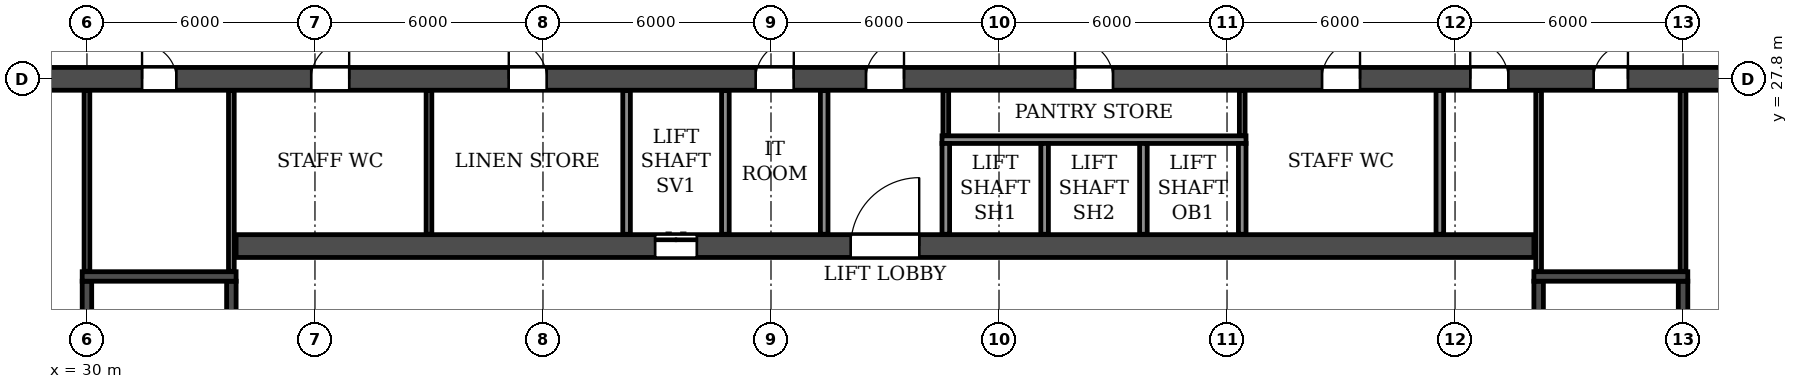
"""IFC4 building model, lengths in metres.
Left out: names, types, materials, properties, quantities, classifications, styles, units other than length and angle.
Written with IfcOpenShell. Run it as: python <this file> out.ifc"""

import sys

from ifc_helpers import new_model, si_unit, direction, frame, frame_2d, origin, place, context, subcontext, project, spatial, rectangle, extrude, element, fill, save


model = new_model("IFC4")
c1 = context("Model", 3, precision=1e-05, world=origin(), true_north=direction((0.0, 1.0)))
c2 = subcontext(c1, "Body", "Model", "MODEL_VIEW")
j1 = project(units=[si_unit("LENGTHUNIT", "METRE"), si_unit("PLANEANGLEUNIT", "RADIAN")], contexts=[c1])
p1 = place(None, origin())
s1 = spatial("IfcSite", under=j1, at=p1, CompositionType="ELEMENT")
p2 = place(p1, origin())
s2 = spatial("IfcBuilding", under=s1, at=p2, CompositionType="ELEMENT")
p3 = place(p2, frame((0.0, 0.0, 56.4)))
s3 = spatial("IfcBuildingStorey", under=s2, at=p3, CompositionType="ELEMENT", Elevation=56.4)
p4 = place(p3, frame((8.6, 27.8, 0.0), z_axis=(0.0, 0.0, 1.0), x_axis=(1.0, 0.0, 0.0)))
e1 = element("IfcWall", 1, at=p4, inside=s3, PredefinedType="SOLIDWALL", context=c2, shape_type="SweptSolid", body=[
    extrude(rectangle(XDim=84.8, YDim=0.6, at=frame_2d((42.4, 0.0))), origin(), (0.0, 0.0, 1.0), 3.05),
])
p5 = place(p4, frame((1.2, 0.0, 0.0)))
e2 = element("IfcOpeningElement", 2, at=p5, cuts=e1, PredefinedType="OPENING", context=c2, shape_type="SweptSolid", body=[
    extrude(rectangle(XDim=1.0, YDim=2.1, at=frame_2d((0.5, 1.05))), frame((0.0, 0.31, 0.0), z_axis=(0.0, -1.0, 0.0), x_axis=(1.0, 0.0, 0.0)), (0.0, 0.0, 1.0), 0.62),
])
p6 = place(p4, frame((5.9, 0.0, 0.0)))
e3 = element("IfcOpeningElement", 3, at=p6, cuts=e1, PredefinedType="OPENING", context=c2, shape_type="SweptSolid", body=[
    extrude(rectangle(XDim=1.0, YDim=2.1, at=frame_2d((0.5, 1.05))), frame((0.0, 0.31, 0.0), z_axis=(0.0, -1.0, 0.0), x_axis=(1.0, 0.0, 0.0)), (0.0, 0.0, 1.0), 0.62),
])
p7 = place(p4, frame((10.3, 0.0, 0.0)))
e4 = element("IfcOpeningElement", 4, at=p7, cuts=e1, PredefinedType="OPENING", context=c2, shape_type="SweptSolid", body=[
    extrude(rectangle(XDim=1.0, YDim=2.1, at=frame_2d((0.5, 1.05))), frame((0.0, 0.31, 0.0), z_axis=(0.0, -1.0, 0.0), x_axis=(1.0, 0.0, 0.0)), (0.0, 0.0, 1.0), 0.62),
])
p8 = place(p4, frame((13.65, 0.0, 0.0)))
e5 = element("IfcOpeningElement", 5, at=p8, cuts=e1, PredefinedType="OPENING", context=c2, shape_type="SweptSolid", body=[
    extrude(rectangle(XDim=0.9, YDim=2.1, at=frame_2d((0.45, 1.05))), frame((0.0, 0.31, 0.0), z_axis=(0.0, -1.0, 0.0), x_axis=(1.0, 0.0, 0.0)), (0.0, 0.0, 1.0), 0.62),
])
p9 = place(p4, frame((22.85, 0.0, 0.0)))
e6 = element("IfcOpeningElement", 6, at=p9, cuts=e1, PredefinedType="OPENING", context=c2, shape_type="SweptSolid", body=[
    extrude(rectangle(XDim=0.9, YDim=2.1, at=frame_2d((0.45, 1.05))), frame((0.0, 0.31, 0.0), z_axis=(0.0, -1.0, 0.0), x_axis=(1.0, 0.0, 0.0)), (0.0, 0.0, 1.0), 0.62),
])
p10 = place(p4, frame((27.3, 0.0, 0.0)))
e7 = element("IfcOpeningElement", 7, at=p10, cuts=e1, PredefinedType="OPENING", context=c2, shape_type="SweptSolid", body=[
    extrude(rectangle(XDim=1.0, YDim=2.1, at=frame_2d((0.5, 1.05))), frame((0.0, 0.31, 0.0), z_axis=(0.0, -1.0, 0.0), x_axis=(1.0, 0.0, 0.0)), (0.0, 0.0, 1.0), 0.62),
])
p11 = place(p4, frame((32.5, 0.0, 0.0)))
e8 = element("IfcOpeningElement", 8, at=p11, cuts=e1, PredefinedType="OPENING", context=c2, shape_type="SweptSolid", body=[
    extrude(rectangle(XDim=1.0, YDim=2.1, at=frame_2d((0.5, 1.05))), frame((0.0, 0.31, 0.0), z_axis=(0.0, -1.0, 0.0), x_axis=(1.0, 0.0, 0.0)), (0.0, 0.0, 1.0), 0.62),
])
p12 = place(p4, frame((39.0, 0.0, 0.0)))
e9 = element("IfcOpeningElement", 9, at=p12, cuts=e1, PredefinedType="OPENING", context=c2, shape_type="SweptSolid", body=[
    extrude(rectangle(XDim=1.0, YDim=2.1, at=frame_2d((0.5, 1.05))), frame((0.0, 0.31, 0.0), z_axis=(0.0, -1.0, 0.0), x_axis=(1.0, 0.0, 0.0)), (0.0, 0.0, 1.0), 0.62),
])
p13 = place(p4, frame((41.9, 0.0, 0.0)))
e10 = element("IfcOpeningElement", 10, at=p13, cuts=e1, PredefinedType="OPENING", context=c2, shape_type="SweptSolid", body=[
    extrude(rectangle(XDim=1.0, YDim=2.1, at=frame_2d((0.5, 1.05))), frame((0.0, 0.31, 0.0), z_axis=(0.0, -1.0, 0.0), x_axis=(1.0, 0.0, 0.0)), (0.0, 0.0, 1.0), 0.62),
])
p14 = place(p4, frame((47.4, 0.0, 0.0)))
e11 = element("IfcOpeningElement", 11, at=p14, cuts=e1, PredefinedType="OPENING", context=c2, shape_type="SweptSolid", body=[
    extrude(rectangle(XDim=1.0, YDim=2.1, at=frame_2d((0.5, 1.05))), frame((0.0, 0.31, 0.0), z_axis=(0.0, -1.0, 0.0), x_axis=(1.0, 0.0, 0.0)), (0.0, 0.0, 1.0), 0.62),
])
p15 = place(p4, frame((53.9, 0.0, 0.0)))
e12 = element("IfcOpeningElement", 12, at=p15, cuts=e1, PredefinedType="OPENING", context=c2, shape_type="SweptSolid", body=[
    extrude(rectangle(XDim=1.0, YDim=2.1, at=frame_2d((0.5, 1.05))), frame((0.0, 0.31, 0.0), z_axis=(0.0, -1.0, 0.0), x_axis=(1.0, 0.0, 0.0)), (0.0, 0.0, 1.0), 0.62),
])
p16 = place(p4, frame((57.8, 0.0, 0.0)))
e13 = element("IfcOpeningElement", 13, at=p16, cuts=e1, PredefinedType="OPENING", context=c2, shape_type="SweptSolid", body=[
    extrude(rectangle(XDim=1.0, YDim=2.1, at=frame_2d((0.5, 1.05))), frame((0.0, 0.31, 0.0), z_axis=(0.0, -1.0, 0.0), x_axis=(1.0, 0.0, 0.0)), (0.0, 0.0, 1.0), 0.62),
])
p17 = place(p4, frame((61.05, 0.0, 0.0)))
e14 = element("IfcOpeningElement", 14, at=p17, cuts=e1, PredefinedType="OPENING", context=c2, shape_type="SweptSolid", body=[
    extrude(rectangle(XDim=0.9, YDim=2.1, at=frame_2d((0.45, 1.05))), frame((0.0, 0.31, 0.0), z_axis=(0.0, -1.0, 0.0), x_axis=(1.0, 0.0, 0.0)), (0.0, 0.0, 1.0), 0.62),
])
p18 = place(p4, frame((70.25, 0.0, 0.0)))
e15 = element("IfcOpeningElement", 15, at=p18, cuts=e1, PredefinedType="OPENING", context=c2, shape_type="SweptSolid", body=[
    extrude(rectangle(XDim=0.9, YDim=2.1, at=frame_2d((0.45, 1.05))), frame((0.0, 0.31, 0.0), z_axis=(0.0, -1.0, 0.0), x_axis=(1.0, 0.0, 0.0)), (0.0, 0.0, 1.0), 0.62),
])
p19 = place(p4, frame((73.5, 0.0, 0.0)))
e16 = element("IfcOpeningElement", 16, at=p19, cuts=e1, PredefinedType="OPENING", context=c2, shape_type="SweptSolid", body=[
    extrude(rectangle(XDim=1.0, YDim=2.1, at=frame_2d((0.5, 1.05))), frame((0.0, 0.31, 0.0), z_axis=(0.0, -1.0, 0.0), x_axis=(1.0, 0.0, 0.0)), (0.0, 0.0, 1.0), 0.62),
])
p20 = place(p4, frame((77.75, 0.0, 0.0)))
e17 = element("IfcOpeningElement", 17, at=p20, cuts=e1, PredefinedType="OPENING", context=c2, shape_type="SweptSolid", body=[
    extrude(rectangle(XDim=1.0, YDim=2.1, at=frame_2d((0.5, 1.05))), frame((0.0, 0.31, 0.0), z_axis=(0.0, -1.0, 0.0), x_axis=(1.0, 0.0, 0.0)), (0.0, 0.0, 1.0), 0.62),
])
p21 = place(p4, frame((82.45, 0.0, 0.0)))
e18 = element("IfcOpeningElement", 18, at=p21, cuts=e1, PredefinedType="OPENING", context=c2, shape_type="SweptSolid", body=[
    extrude(rectangle(XDim=1.0, YDim=2.1, at=frame_2d((0.5, 1.05))), frame((0.0, 0.31, 0.0), z_axis=(0.0, -1.0, 0.0), x_axis=(1.0, 0.0, 0.0)), (0.0, 0.0, 1.0), 0.62),
])
p22 = place(p3, frame((33.925, 23.4, 0.0), z_axis=(0.0, 0.0, 1.0), x_axis=(1.0, 0.0, 0.0)))
e19 = element("IfcWall", 19, at=p22, inside=s3, PredefinedType="SOLIDWALL", context=c2, shape_type="SweptSolid", body=[
    extrude(rectangle(XDim=34.15, YDim=0.6, at=frame_2d((17.075, 0.0))), origin(), (0.0, 0.0, 1.0), 3.05),
])
p23 = place(p22, frame((16.175, 0.0, 0.0)))
e20 = element("IfcOpeningElement", 20, at=p23, cuts=e19, PredefinedType="OPENING", context=c2, shape_type="SweptSolid", body=[
    extrude(rectangle(XDim=1.8, YDim=2.1, at=frame_2d((0.9, 1.05))), frame((0.0, 0.31, 0.0), z_axis=(0.0, -1.0, 0.0), x_axis=(1.0, 0.0, 0.0)), (0.0, 0.0, 1.0), 0.62),
])
p24 = place(p22, frame((11.025, 0.0, 0.0)))
e21 = element("IfcOpeningElement", 21, at=p24, cuts=e19, PredefinedType="OPENING", context=c2, shape_type="SweptSolid", body=[
    extrude(rectangle(XDim=1.1, YDim=2.1, at=frame_2d((0.55, 1.05))), frame((0.0, 0.31, 0.0), z_axis=(0.0, -1.0, 0.0), x_axis=(1.0, 0.0, 0.0)), (0.0, 0.0, 1.0), 0.62),
])
p25 = place(p3, frame((30.0, 14.9, 0.0), z_axis=(0.0, 0.0, 1.0), x_axis=(0.0, 1.0, 0.0)))
e22 = element("IfcWall", 22, at=p25, inside=s3, PredefinedType="SOLIDWALL", context=c2, shape_type="SweptSolid", body=[
    extrude(rectangle(XDim=7.575, YDim=0.25, at=frame_2d((3.788, 0.0))), origin(), (0.0, 0.0, 1.0), 3.05),
])
p26 = place(p3, frame((33.8, 14.9, 0.0), z_axis=(0.0, 0.0, 1.0), x_axis=(0.0, 1.0, 0.0)))
e23 = element("IfcWall", 23, at=p26, inside=s3, PredefinedType="SOLIDWALL", context=c2, shape_type="SweptSolid", body=[
    extrude(rectangle(XDim=7.575, YDim=0.25, at=frame_2d((3.788, 0.0))), origin(), (0.0, 0.0, 1.0), 3.05),
])
p27 = place(p26, frame((0.4, 0.0, 0.0)))
e24 = element("IfcOpeningElement", 24, at=p27, cuts=e23, PredefinedType="OPENING", context=c2, shape_type="SweptSolid", body=[
    extrude(rectangle(XDim=1.0, YDim=2.1, at=frame_2d((0.5, 1.05))), frame((0.0, 0.135, 0.0), z_axis=(0.0, -1.0, 0.0), x_axis=(1.0, 0.0, 0.0)), (0.0, 0.0, 1.0), 0.27),
])
p28 = place(p3, frame((29.875, 22.6, 0.0), z_axis=(0.0, 0.0, 1.0), x_axis=(1.0, 0.0, 0.0)))
e25 = element("IfcWall", 25, at=p28, inside=s3, PredefinedType="SOLIDWALL", context=c2, shape_type="SweptSolid", body=[
    extrude(rectangle(XDim=4.05, YDim=0.25, at=frame_2d((2.025, 0.0))), origin(), (0.0, 0.0, 1.0), 3.05),
])
p29 = place(p3, frame((68.2, 14.9, 0.0), z_axis=(0.0, 0.0, 1.0), x_axis=(0.0, 1.0, 0.0)))
e26 = element("IfcWall", 26, at=p29, inside=s3, PredefinedType="SOLIDWALL", context=c2, shape_type="SweptSolid", body=[
    extrude(rectangle(XDim=7.575, YDim=0.25, at=frame_2d((3.788, 0.0))), origin(), (0.0, 0.0, 1.0), 3.05),
])
p30 = place(p29, frame((0.4, 0.0, 0.0)))
e27 = element("IfcOpeningElement", 27, at=p30, cuts=e26, PredefinedType="OPENING", context=c2, shape_type="SweptSolid", body=[
    extrude(rectangle(XDim=1.0, YDim=2.1, at=frame_2d((0.5, 1.05))), frame((0.0, 0.135, 0.0), z_axis=(0.0, -1.0, 0.0), x_axis=(1.0, 0.0, 0.0)), (0.0, 0.0, 1.0), 0.27),
])
p31 = place(p3, frame((72.0, 14.9, 0.0), z_axis=(0.0, 0.0, 1.0), x_axis=(0.0, 1.0, 0.0)))
e28 = element("IfcWall", 28, at=p31, inside=s3, PredefinedType="SOLIDWALL", context=c2, shape_type="SweptSolid", body=[
    extrude(rectangle(XDim=7.575, YDim=0.25, at=frame_2d((3.788, 0.0))), origin(), (0.0, 0.0, 1.0), 3.05),
])
p32 = place(p3, frame((68.075, 22.6, 0.0), z_axis=(0.0, 0.0, 1.0), x_axis=(1.0, 0.0, 0.0)))
e29 = element("IfcWall", 29, at=p32, inside=s3, PredefinedType="SOLIDWALL", context=c2, shape_type="SweptSolid", body=[
    extrude(rectangle(XDim=4.05, YDim=0.25, at=frame_2d((2.025, 0.0))), origin(), (0.0, 0.0, 1.0), 3.05),
])
p33 = place(p3, frame((52.6, 26.3, 0.0), z_axis=(0.0, 0.0, 1.0), x_axis=(0.0, 1.0, 0.0)))
e30 = element("IfcWall", 30, at=p33, inside=s3, PredefinedType="PARTITIONING", context=c2, shape_type="SweptSolid", body=[
    extrude(rectangle(XDim=1.19, YDim=0.15, at=frame_2d((0.595, 0.0))), origin(), (0.0, 0.0, 1.0), 3.05),
])
p34 = place(p3, frame((39.0, 23.71, 0.0), z_axis=(0.0, 0.0, 1.0), x_axis=(0.0, 1.0, 0.0)))
e31 = element("IfcWall", 31, at=p34, inside=s3, PredefinedType="PARTITIONING", context=c2, shape_type="SweptSolid", body=[
    extrude(rectangle(XDim=3.78, YDim=0.15, at=frame_2d((1.89, 0.0))), origin(), (0.0, 0.0, 1.0), 3.05),
])
p35 = place(p3, frame((60.4, 26.3, 0.0), z_axis=(0.0, 0.0, 1.0), x_axis=(0.0, 1.0, 0.0)))
e32 = element("IfcWall", 32, at=p35, inside=s3, PredefinedType="PARTITIONING", context=c2, shape_type="SweptSolid", body=[
    extrude(rectangle(XDim=1.19, YDim=0.15, at=frame_2d((0.595, 0.0))), origin(), (0.0, 0.0, 1.0), 3.05),
])
for number, where, z_axis, x_axis in (
    (33, (49.4, 23.71, 0.0), (0.0, 0.0, 1.0), (0.0, 1.0, 0.0)),
    (34, (65.6, 23.71, 0.0), (0.0, 0.0, 1.0), (0.0, 1.0, 0.0)),
):
    element("IfcWall", number, at=place(p3, frame(where, z_axis=z_axis, x_axis=x_axis)), inside=s3, PredefinedType="PARTITIONING", context=c2, shape_type="SweptSolid", body=[
        extrude(rectangle(XDim=3.78, YDim=0.2, at=frame_2d((1.89, 0.0))), origin(), (0.0, 0.0, 1.0), 3.05),
    ])
for number, where, z_axis, x_axis in (
    (35, (30.0, 22.735, 0.0), (0.0, 0.0, 1.0), (0.0, 1.0, 0.0)),
    (36, (33.8, 22.735, 0.0), (0.0, 0.0, 1.0), (0.0, 1.0, 0.0)),
    (37, (68.2, 22.735, 0.0), (0.0, 0.0, 1.0), (0.0, 1.0, 0.0)),
    (38, (72.0, 22.735, 0.0), (0.0, 0.0, 1.0), (0.0, 1.0, 0.0)),
):
    element("IfcWall", number, at=place(p3, frame(where, z_axis=z_axis, x_axis=x_axis)), inside=s3, PredefinedType="PARTITIONING", context=c2, shape_type="SweptSolid", body=[
        extrude(rectangle(XDim=4.755, YDim=0.15, at=frame_2d((2.377, 0.0))), origin(), (0.0, 0.0, 1.0), 3.05),
    ])
p36 = place(p3, frame((52.5, 26.2, 0.0), z_axis=(0.0, 0.0, 1.0), x_axis=(1.0, 0.0, 0.0)))
e39 = element("IfcWall", 39, at=p36, inside=s3, PredefinedType="PARTITIONING", context=c2, shape_type="SweptSolid", body=[
    extrude(rectangle(XDim=8.0, YDim=0.2, at=frame_2d((4.0, 0.0))), origin(), (0.0, 0.0, 1.0), 3.05),
])
for number, where, z_axis, x_axis in (
    (40, (44.2, 23.71, 0.0), (0.0, 0.0, 1.0), (0.0, 1.0, 0.0)),
    (41, (46.8, 23.71, 0.0), (0.0, 0.0, 1.0), (0.0, 1.0, 0.0)),
):
    element("IfcWall", number, at=place(p3, frame(where, z_axis=z_axis, x_axis=x_axis)), inside=s3, PredefinedType="PARTITIONING", context=c2, shape_type="SweptSolid", body=[
        extrude(rectangle(XDim=3.78, YDim=0.2, at=frame_2d((1.89, 0.0))), origin(), (0.0, 0.0, 1.0), 3.05),
    ])
for number, where, z_axis, x_axis in (
    (42, (52.6, 23.71, 0.0), (0.0, 0.0, 1.0), (0.0, 1.0, 0.0)),
    (43, (55.2, 23.71, 0.0), (0.0, 0.0, 1.0), (0.0, 1.0, 0.0)),
    (44, (57.8, 23.71, 0.0), (0.0, 0.0, 1.0), (0.0, 1.0, 0.0)),
    (45, (60.4, 23.71, 0.0), (0.0, 0.0, 1.0), (0.0, 1.0, 0.0)),
):
    element("IfcWall", number, at=place(p3, frame(where, z_axis=z_axis, x_axis=x_axis)), inside=s3, PredefinedType="PARTITIONING", context=c2, shape_type="SweptSolid", body=[
        extrude(rectangle(XDim=2.39, YDim=0.2, at=frame_2d((1.195, 0.0))), origin(), (0.0, 0.0, 1.0), 3.05),
    ])
p37 = place(p9, origin())
e46 = element("IfcDoor", 46, at=p37, inside=s3, OperationType="SINGLE_SWING_LEFT", PredefinedType="DOOR", context=c2, shape_type="SweptSolid", body=[
    extrude(rectangle(XDim=0.9, YDim=2.1, at=frame_2d((0.45, 1.05))), frame((0.0, 0.025, 0.0), z_axis=(0.0, -1.0, 0.0), x_axis=(1.0, 0.0, 0.0)), (0.0, 0.0, 1.0), 0.05),
])
fill(e6, e46)
p38 = place(p10, origin())
e47 = element("IfcDoor", 47, at=p38, inside=s3, OperationType="SINGLE_SWING_RIGHT", PredefinedType="DOOR", context=c2, shape_type="SweptSolid", body=[
    extrude(rectangle(XDim=1.0, YDim=2.1, at=frame_2d((0.5, 1.05))), frame((0.0, 0.025, 0.0), z_axis=(0.0, -1.0, 0.0), x_axis=(1.0, 0.0, 0.0)), (0.0, 0.0, 1.0), 0.05),
])
fill(e7, e47)
p39 = place(p11, origin())
e48 = element("IfcDoor", 48, at=p39, inside=s3, OperationType="SINGLE_SWING_LEFT", PredefinedType="DOOR", context=c2, shape_type="SweptSolid", body=[
    extrude(rectangle(XDim=1.0, YDim=2.1, at=frame_2d((0.5, 1.05))), frame((0.0, 0.025, 0.0), z_axis=(0.0, -1.0, 0.0), x_axis=(1.0, 0.0, 0.0)), (0.0, 0.0, 1.0), 0.05),
])
fill(e8, e48)
p40 = place(p12, origin())
e49 = element("IfcDoor", 49, at=p40, inside=s3, OperationType="SINGLE_SWING_RIGHT", PredefinedType="DOOR", context=c2, shape_type="SweptSolid", body=[
    extrude(rectangle(XDim=1.0, YDim=2.1, at=frame_2d((0.5, 1.05))), frame((0.0, 0.025, 0.0), z_axis=(0.0, -1.0, 0.0), x_axis=(1.0, 0.0, 0.0)), (0.0, 0.0, 1.0), 0.05),
])
fill(e9, e49)
p41 = place(p13, origin())
e50 = element("IfcDoor", 50, at=p41, inside=s3, OperationType="SINGLE_SWING_RIGHT", PredefinedType="DOOR", context=c2, shape_type="SweptSolid", body=[
    extrude(rectangle(XDim=1.0, YDim=2.1, at=frame_2d((0.5, 1.05))), frame((0.0, 0.025, 0.0), z_axis=(0.0, -1.0, 0.0), x_axis=(1.0, 0.0, 0.0)), (0.0, 0.0, 1.0), 0.05),
])
fill(e10, e50)
p42 = place(p14, origin())
e51 = element("IfcDoor", 51, at=p42, inside=s3, OperationType="SINGLE_SWING_LEFT", PredefinedType="DOOR", context=c2, shape_type="SweptSolid", body=[
    extrude(rectangle(XDim=1.0, YDim=2.1, at=frame_2d((0.5, 1.05))), frame((0.0, 0.025, 0.0), z_axis=(0.0, -1.0, 0.0), x_axis=(1.0, 0.0, 0.0)), (0.0, 0.0, 1.0), 0.05),
])
fill(e11, e51)
p43 = place(p15, origin())
e52 = element("IfcDoor", 52, at=p43, inside=s3, OperationType="SINGLE_SWING_RIGHT", PredefinedType="DOOR", context=c2, shape_type="SweptSolid", body=[
    extrude(rectangle(XDim=1.0, YDim=2.1, at=frame_2d((0.5, 1.05))), frame((0.0, 0.025, 0.0), z_axis=(0.0, -1.0, 0.0), x_axis=(1.0, 0.0, 0.0)), (0.0, 0.0, 1.0), 0.05),
])
fill(e12, e52)
p44 = place(p16, origin())
e53 = element("IfcDoor", 53, at=p44, inside=s3, OperationType="SINGLE_SWING_LEFT", PredefinedType="DOOR", context=c2, shape_type="SweptSolid", body=[
    extrude(rectangle(XDim=1.0, YDim=2.1, at=frame_2d((0.5, 1.05))), frame((0.0, 0.025, 0.0), z_axis=(0.0, -1.0, 0.0), x_axis=(1.0, 0.0, 0.0)), (0.0, 0.0, 1.0), 0.05),
])
fill(e13, e53)
p45 = place(p17, origin())
e54 = element("IfcDoor", 54, at=p45, inside=s3, OperationType="SINGLE_SWING_RIGHT", PredefinedType="DOOR", context=c2, shape_type="SweptSolid", body=[
    extrude(rectangle(XDim=0.9, YDim=2.1, at=frame_2d((0.45, 1.05))), frame((0.0, 0.025, 0.0), z_axis=(0.0, -1.0, 0.0), x_axis=(1.0, 0.0, 0.0)), (0.0, 0.0, 1.0), 0.05),
])
fill(e14, e54)
p46 = place(p23, origin())
e55 = element("IfcDoor", 55, at=p46, inside=s3, OperationType="DOUBLE_DOOR_SINGLE_SWING", PredefinedType="DOOR", context=c2, shape_type="SweptSolid", body=[
    extrude(rectangle(XDim=1.8, YDim=2.1, at=frame_2d((0.9, 1.05))), frame((0.0, 0.025, 0.0), z_axis=(0.0, -1.0, 0.0), x_axis=(1.0, 0.0, 0.0)), (0.0, 0.0, 1.0), 0.05),
])
fill(e20, e55)
p47 = place(p24, origin())
e56 = element("IfcDoor", 56, at=p47, inside=s3, OperationType="DOUBLE_DOOR_SLIDING", PredefinedType="DOOR", context=c2, shape_type="SweptSolid", body=[
    extrude(rectangle(XDim=1.1, YDim=2.1, at=frame_2d((0.55, 1.05))), frame((0.0, 0.025, 0.0), z_axis=(0.0, -1.0, 0.0), x_axis=(1.0, 0.0, 0.0)), (0.0, 0.0, 1.0), 0.05),
])
fill(e21, e56)
save(model, sys.argv[1])
